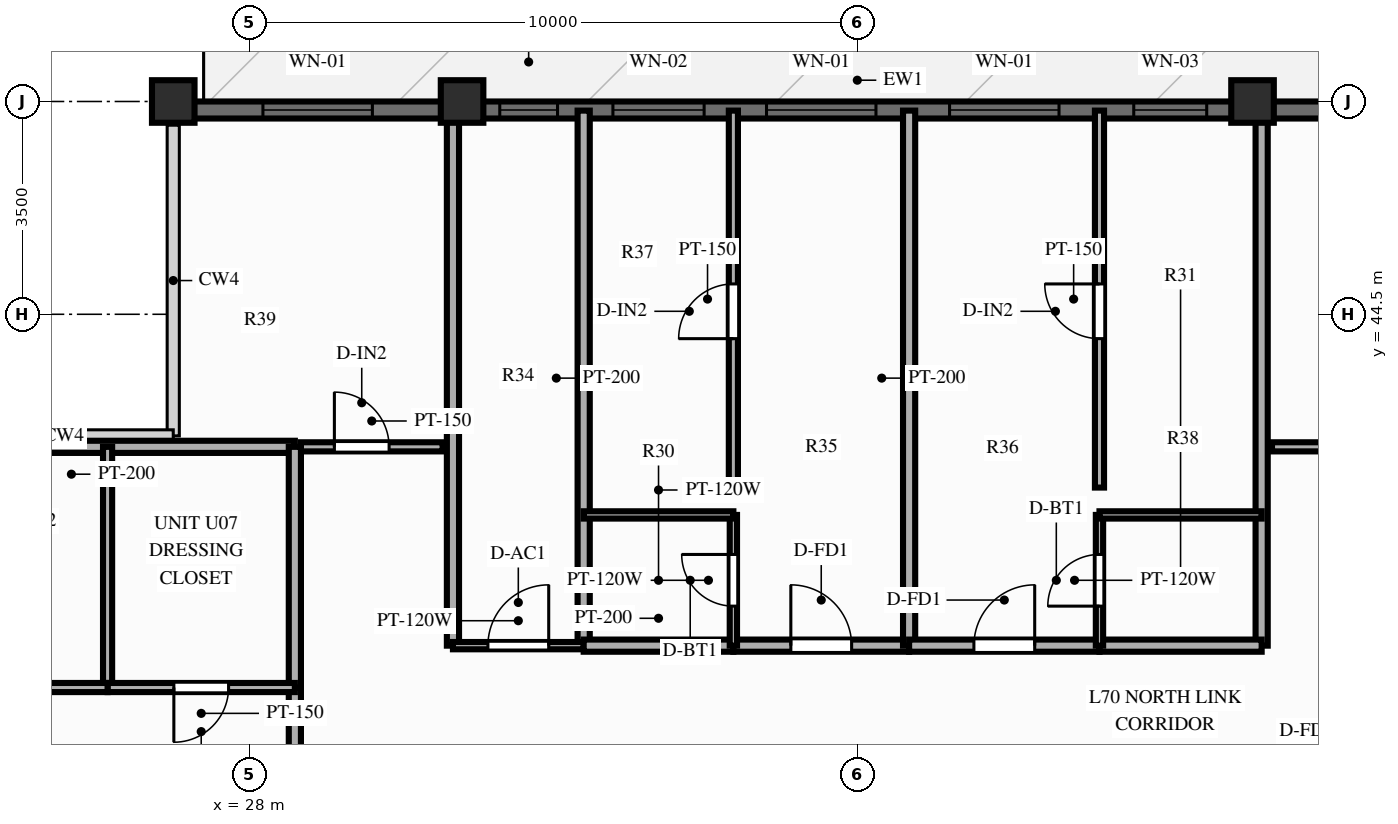
"""IFC4 building model, lengths in metres.
Left out: names, types, materials, properties, quantities, classifications, styles, units other than length and angle.
Written with IfcOpenShell. Run it as: python <this file> out.ifc"""

import sys

from ifc_helpers import new_model, si_unit, direction, frame, frame_2d, origin, origin_2d, place, context, subcontext, project, spatial, rectangle, extrude, source, transform, mapped, element, fill, save


model = new_model("IFC4")
c1 = context("Model", 3, precision=1e-05, world=origin(), true_north=direction((0.0, 1.0)))
c2 = subcontext(c1, "Body", "Model", "MODEL_VIEW")
j1 = project(units=[si_unit("LENGTHUNIT", "METRE"), si_unit("PLANEANGLEUNIT", "RADIAN")], contexts=[c1])
p1 = place(None, origin())
s1 = spatial("IfcSite", under=j1, at=p1, CompositionType="ELEMENT")
p2 = place(p1, origin())
s2 = spatial("IfcBuilding", under=s1, at=p2, CompositionType="ELEMENT")
p3 = place(p2, frame((0.0, 0.0, 226.2)))
s3 = spatial("IfcBuildingStorey", under=s2, at=p3, CompositionType="ELEMENT", Elevation=226.2)
m1 = source(origin(), c2, "Body", "SweptSolid", [
    extrude(rectangle(XDim=0.7, YDim=0.7, at=origin_2d()), origin(), (0.0, 0.0, 1.0), 3.9),
])
for number, where, z_axis, x_axis in (
    (1, (44.5, 48.0, 0.0), (0.0, 0.0, 1.0), (1.0, 0.0, 0.0)),
    (2, (31.5, 48.0, 0.0), (0.0, 0.0, 1.0), (1.0, 0.0, 0.0)),
    (3, (26.75, 48.0, 0.0), (0.0, 0.0, 1.0), (1.0, 0.0, 0.0)),
):
    element("IfcColumn", number, at=place(p3, frame(where, z_axis=z_axis, x_axis=x_axis)), inside=s3, PredefinedType="COLUMN", context=c2, shape_type="MappedRepresentation", body=[
        mapped(m1, transform((0.0, 0.0, 0.0), scale=1.0)),
    ])
p4 = place(p3, frame((26.75, 47.86, 0.0), z_axis=(0.0, 0.0, 1.0), x_axis=(1.0, 0.0, 0.0)))
e4 = element("IfcWall", 4, at=p4, inside=s3, PredefinedType="SOLIDWALL", context=c2, shape_type="SweptSolid", body=[
    extrude(rectangle(XDim=22.5, YDim=0.28, at=frame_2d((11.25, 0.0))), origin(), (0.0, 0.0, 1.0), 2.79),
])
p5 = place(p4, frame((1.475, 0.0, 0.85)))
e5 = element("IfcOpeningElement", 5, at=p5, cuts=e4, PredefinedType="OPENING", context=c2, shape_type="SweptSolid", body=[
    extrude(rectangle(XDim=1.8, YDim=1.65, at=frame_2d((0.9, 0.825))), frame((0.0, 0.152, 0.0), z_axis=(0.0, -1.0, 0.0), x_axis=(1.0, 0.0, 0.0)), (0.0, 0.0, 1.0), 0.304),
])
p6 = place(p4, frame((5.37, 0.0, 0.85)))
e6 = element("IfcOpeningElement", 6, at=p6, cuts=e4, PredefinedType="OPENING", context=c2, shape_type="SweptSolid", body=[
    extrude(rectangle(XDim=0.95, YDim=1.5, at=frame_2d((0.475, 0.75))), frame((0.0, 0.152, 0.0), z_axis=(0.0, -1.0, 0.0), x_axis=(1.0, 0.0, 0.0)), (0.0, 0.0, 1.0), 0.304),
])
p7 = place(p4, frame((7.231, 0.0, 0.85)))
e7 = element("IfcOpeningElement", 7, at=p7, cuts=e4, PredefinedType="OPENING", context=c2, shape_type="SweptSolid", body=[
    extrude(rectangle(XDim=1.5, YDim=1.65, at=frame_2d((0.75, 0.825))), frame((0.0, 0.152, 0.0), z_axis=(0.0, -1.0, 0.0), x_axis=(1.0, 0.0, 0.0)), (0.0, 0.0, 1.0), 0.304),
])
p8 = place(p4, frame((9.757, 0.0, 0.85)))
e8 = element("IfcOpeningElement", 8, at=p8, cuts=e4, PredefinedType="OPENING", context=c2, shape_type="SweptSolid", body=[
    extrude(rectangle(XDim=1.8, YDim=1.65, at=frame_2d((0.9, 0.825))), frame((0.0, 0.152, 0.0), z_axis=(0.0, -1.0, 0.0), x_axis=(1.0, 0.0, 0.0)), (0.0, 0.0, 1.0), 0.304),
])
p9 = place(p4, frame((12.767, 0.0, 0.85)))
e9 = element("IfcOpeningElement", 9, at=p9, cuts=e4, PredefinedType="OPENING", context=c2, shape_type="SweptSolid", body=[
    extrude(rectangle(XDim=1.8, YDim=1.65, at=frame_2d((0.9, 0.825))), frame((0.0, 0.152, 0.0), z_axis=(0.0, -1.0, 0.0), x_axis=(1.0, 0.0, 0.0)), (0.0, 0.0, 1.0), 0.304),
])
p10 = place(p4, frame((15.796, 0.0, 0.85)))
e10 = element("IfcOpeningElement", 10, at=p10, cuts=e4, PredefinedType="OPENING", context=c2, shape_type="SweptSolid", body=[
    extrude(rectangle(XDim=1.2, YDim=1.5, at=frame_2d((0.6, 0.75))), frame((0.0, 0.152, 0.0), z_axis=(0.0, -1.0, 0.0), x_axis=(1.0, 0.0, 0.0)), (0.0, 0.0, 1.0), 0.304),
])
p11 = place(p4, frame((19.575, 0.0, 0.0)))
e11 = element("IfcOpeningElement", 11, at=p11, cuts=e4, PredefinedType="OPENING", context=c2, shape_type="SweptSolid", body=[
    extrude(rectangle(XDim=1.1, YDim=2.15, at=frame_2d((0.55, 1.075))), frame((0.0, 0.152, 0.0), z_axis=(0.0, -1.0, 0.0), x_axis=(1.0, 0.0, 0.0)), (0.0, 0.0, 1.0), 0.304),
])
p12 = place(p3, frame((28.85, 42.32, 0.0), z_axis=(0.0, 0.0, 1.0), x_axis=(1.0, 0.0, 0.0)))
e12 = element("IfcWall", 12, at=p12, inside=s3, PredefinedType="PARTITIONING", context=c2, shape_type="SweptSolid", body=[
    extrude(rectangle(XDim=2.33, YDim=0.15, at=frame_2d((1.165, 0.0))), origin(), (0.0, 0.0, 1.0), 3.69),
])
p13 = place(p12, frame((0.55, 0.0, 0.0)))
e13 = element("IfcOpeningElement", 13, at=p13, cuts=e12, PredefinedType="OPENING", context=c2, shape_type="SweptSolid", body=[
    extrude(rectangle(XDim=0.9, YDim=2.1, at=frame_2d((0.45, 1.05))), frame((0.0, 0.087, 0.0), z_axis=(0.0, -1.0, 0.0), x_axis=(1.0, 0.0, 0.0)), (0.0, 0.0, 1.0), 0.174),
])
p14 = place(p3, frame((44.82, 42.32, 0.0), z_axis=(0.0, 0.0, 1.0), x_axis=(1.0, 0.0, 0.0)))
e14 = element("IfcWall", 14, at=p14, inside=s3, PredefinedType="PARTITIONING", context=c2, shape_type="SweptSolid", body=[
    extrude(rectangle(XDim=2.33, YDim=0.15, at=frame_2d((1.165, 0.0))), origin(), (0.0, 0.0, 1.0), 3.69),
])
p15 = place(p14, frame((0.88, 0.0, 0.0)))
e15 = element("IfcOpeningElement", 15, at=p15, cuts=e14, PredefinedType="OPENING", context=c2, shape_type="SweptSolid", body=[
    extrude(rectangle(XDim=0.9, YDim=2.1, at=frame_2d((0.45, 1.05))), frame((0.0, 0.087, 0.0), z_axis=(0.0, -1.0, 0.0), x_axis=(1.0, 0.0, 0.0)), (0.0, 0.0, 1.0), 0.174),
])
for number, where, z_axis, x_axis in (
    (16, (31.35, 39.05, 0.0), (0.0, 0.0, 1.0), (0.0, 1.0, 0.0)),
    (17, (44.65, 39.05, 0.0), (0.0, 0.0, 1.0), (0.0, 1.0, 0.0)),
):
    element("IfcWall", number, at=place(p3, frame(where, z_axis=z_axis, x_axis=x_axis)), inside=s3, PredefinedType="PARTITIONING", context=c2, shape_type="SweptSolid", body=[
        extrude(rectangle(XDim=8.8, YDim=0.2, at=frame_2d((4.4, 0.0))), origin(), (0.0, 0.0, 1.0), 2.79),
    ])
p16 = place(p3, frame((33.5, 39.05, 0.0), z_axis=(0.0, 0.0, 1.0), x_axis=(0.0, 1.0, 0.0)))
e18 = element("IfcWall", 18, at=p16, inside=s3, PredefinedType="PARTITIONING", context=c2, shape_type="SweptSolid", body=[
    extrude(rectangle(XDim=8.8, YDim=0.2, at=frame_2d((4.4, 0.0))), origin(), (0.0, 0.0, 1.0), 3.69),
])
p17 = place(p3, frame((31.35, 39.05, 0.0), z_axis=(0.0, 0.0, 1.0), x_axis=(1.0, 0.0, 0.0)))
e19 = element("IfcWall", 19, at=p17, inside=s3, PredefinedType="PARTITIONING", context=c2, shape_type="SweptSolid", body=[
    extrude(rectangle(XDim=2.15, YDim=0.12, at=frame_2d((1.075, 0.0))), origin(), (0.0, 0.0, 1.0), 3.69),
])
p18 = place(p17, frame((0.575, 0.0, 0.0)))
e20 = element("IfcOpeningElement", 20, at=p18, cuts=e19, PredefinedType="OPENING", context=c2, shape_type="SweptSolid", body=[
    extrude(rectangle(XDim=1.0, YDim=2.1, at=frame_2d((0.5, 1.05))), frame((0.0, 0.072, 0.0), z_axis=(0.0, -1.0, 0.0), x_axis=(1.0, 0.0, 0.0)), (0.0, 0.0, 1.0), 0.144),
])
p19 = place(p3, frame((33.5, 39.05, 0.0), z_axis=(0.0, 0.0, 1.0), x_axis=(1.0, 0.0, 0.0)))
e21 = element("IfcWall", 21, at=p19, inside=s3, PredefinedType="PARTITIONING", context=c2, shape_type="SweptSolid", body=[
    extrude(rectangle(XDim=2.462, YDim=0.2, at=frame_2d((1.231, 0.0))), origin(), (0.0, 0.0, 1.0), 3.69),
])
p20 = place(p3, frame((35.962, 39.05, 0.0), z_axis=(0.0, 0.0, 1.0), x_axis=(1.0, 0.0, 0.0)))
e22 = element("IfcWall", 22, at=p20, inside=s3, PredefinedType="PARTITIONING", context=c2, shape_type="SweptSolid", body=[
    extrude(rectangle(XDim=2.89, YDim=0.2, at=frame_2d((1.445, 0.0))), origin(), (0.0, 0.0, 1.0), 3.69),
])
p21 = place(p20, frame((0.945, 0.0, 0.0)))
e23 = element("IfcOpeningElement", 23, at=p21, cuts=e22, PredefinedType="OPENING", context=c2, shape_type="SweptSolid", body=[
    extrude(rectangle(XDim=1.0, YDim=2.15, at=frame_2d((0.5, 1.075))), frame((0.0, 0.112, 0.0), z_axis=(0.0, -1.0, 0.0), x_axis=(1.0, 0.0, 0.0)), (0.0, 0.0, 1.0), 0.224),
])
p22 = place(p3, frame((35.962, 39.05, 0.0), z_axis=(0.0, 0.0, 1.0), x_axis=(0.0, 1.0, 0.0)))
e24 = element("IfcWall", 24, at=p22, inside=s3, PredefinedType="PARTITIONING", context=c2, shape_type="SweptSolid", body=[
    extrude(rectangle(XDim=2.15, YDim=0.12, at=frame_2d((1.075, 0.0))), origin(), (0.0, 0.0, 1.0), 3.69),
])
p23 = place(p22, frame((0.65, 0.0, 0.0)))
e25 = element("IfcOpeningElement", 25, at=p23, cuts=e24, PredefinedType="OPENING", context=c2, shape_type="SweptSolid", body=[
    extrude(rectangle(XDim=0.85, YDim=2.05, at=frame_2d((0.425, 1.025))), frame((0.0, 0.072, 0.0), z_axis=(0.0, -1.0, 0.0), x_axis=(1.0, 0.0, 0.0)), (0.0, 0.0, 1.0), 0.144),
])
p24 = place(p3, frame((33.5, 41.2, 0.0), z_axis=(0.0, 0.0, 1.0), x_axis=(1.0, 0.0, 0.0)))
e26 = element("IfcWall", 26, at=p24, inside=s3, PredefinedType="PARTITIONING", context=c2, shape_type="SweptSolid", body=[
    extrude(rectangle(XDim=2.462, YDim=0.12, at=frame_2d((1.231, 0.0))), origin(), (0.0, 0.0, 1.0), 3.69),
])
p25 = place(p3, frame((35.962, 41.65, 0.0), z_axis=(0.0, 0.0, 1.0), x_axis=(0.0, 1.0, 0.0)))
e27 = element("IfcWall", 27, at=p25, inside=s3, PredefinedType="PARTITIONING", context=c2, shape_type="SweptSolid", body=[
    extrude(rectangle(XDim=6.2, YDim=0.15, at=frame_2d((3.1, 0.0))), origin(), (0.0, 0.0, 1.0), 3.69),
])
p26 = place(p25, frame((2.449, 0.0, 0.0)))
e28 = element("IfcOpeningElement", 28, at=p26, cuts=e27, PredefinedType="OPENING", context=c2, shape_type="SweptSolid", body=[
    extrude(rectangle(XDim=0.9, YDim=2.1, at=frame_2d((0.45, 1.05))), frame((0.0, 0.087, 0.0), z_axis=(0.0, -1.0, 0.0), x_axis=(1.0, 0.0, 0.0)), (0.0, 0.0, 1.0), 0.174),
])
p27 = place(p3, frame((38.852, 39.05, 0.0), z_axis=(0.0, 0.0, 1.0), x_axis=(0.0, 1.0, 0.0)))
e29 = element("IfcWall", 29, at=p27, inside=s3, PredefinedType="PARTITIONING", context=c2, shape_type="SweptSolid", body=[
    extrude(rectangle(XDim=8.8, YDim=0.2, at=frame_2d((4.4, 0.0))), origin(), (0.0, 0.0, 1.0), 3.69),
])
p28 = place(p3, frame((38.852, 39.05, 0.0), z_axis=(0.0, 0.0, 1.0), x_axis=(1.0, 0.0, 0.0)))
e30 = element("IfcWall", 30, at=p28, inside=s3, PredefinedType="PARTITIONING", context=c2, shape_type="SweptSolid", body=[
    extrude(rectangle(XDim=3.131, YDim=0.2, at=frame_2d((1.565, 0.0))), origin(), (0.0, 0.0, 1.0), 3.69),
])
p29 = place(p28, frame((1.065, 0.0, 0.0)))
e31 = element("IfcOpeningElement", 31, at=p29, cuts=e30, PredefinedType="OPENING", context=c2, shape_type="SweptSolid", body=[
    extrude(rectangle(XDim=1.0, YDim=2.15, at=frame_2d((0.5, 1.075))), frame((0.0, 0.112, 0.0), z_axis=(0.0, -1.0, 0.0), x_axis=(1.0, 0.0, 0.0)), (0.0, 0.0, 1.0), 0.224),
])
p30 = place(p3, frame((41.983, 39.05, 0.0), z_axis=(0.0, 0.0, 1.0), x_axis=(1.0, 0.0, 0.0)))
e32 = element("IfcWall", 32, at=p30, inside=s3, PredefinedType="PARTITIONING", context=c2, shape_type="SweptSolid", body=[
    extrude(rectangle(XDim=2.667, YDim=0.2, at=frame_2d((1.333, 0.0))), origin(), (0.0, 0.0, 1.0), 3.69),
])
p31 = place(p3, frame((41.983, 39.05, 0.0), z_axis=(0.0, 0.0, 1.0), x_axis=(0.0, 1.0, 0.0)))
e33 = element("IfcWall", 33, at=p31, inside=s3, PredefinedType="PARTITIONING", context=c2, shape_type="SweptSolid", body=[
    extrude(rectangle(XDim=2.15, YDim=0.12, at=frame_2d((1.075, 0.0))), origin(), (0.0, 0.0, 1.0), 3.69),
])
p32 = place(p31, frame((0.65, 0.0, 0.0)))
e34 = element("IfcOpeningElement", 34, at=p32, cuts=e33, PredefinedType="OPENING", context=c2, shape_type="SweptSolid", body=[
    extrude(rectangle(XDim=0.85, YDim=2.05, at=frame_2d((0.425, 1.025))), frame((0.0, 0.072, 0.0), z_axis=(0.0, -1.0, 0.0), x_axis=(1.0, 0.0, 0.0)), (0.0, 0.0, 1.0), 0.144),
])
p33 = place(p3, frame((41.983, 41.2, 0.0), z_axis=(0.0, 0.0, 1.0), x_axis=(1.0, 0.0, 0.0)))
e35 = element("IfcWall", 35, at=p33, inside=s3, PredefinedType="PARTITIONING", context=c2, shape_type="SweptSolid", body=[
    extrude(rectangle(XDim=2.667, YDim=0.12, at=frame_2d((1.333, 0.0))), origin(), (0.0, 0.0, 1.0), 3.69),
])
p34 = place(p3, frame((41.983, 41.65, 0.0), z_axis=(0.0, 0.0, 1.0), x_axis=(0.0, 1.0, 0.0)))
e36 = element("IfcWall", 36, at=p34, inside=s3, PredefinedType="PARTITIONING", context=c2, shape_type="SweptSolid", body=[
    extrude(rectangle(XDim=6.2, YDim=0.15, at=frame_2d((3.1, 0.0))), origin(), (0.0, 0.0, 1.0), 3.69),
])
p35 = place(p34, frame((2.449, 0.0, 0.0)))
e37 = element("IfcOpeningElement", 37, at=p35, cuts=e36, PredefinedType="OPENING", context=c2, shape_type="SweptSolid", body=[
    extrude(rectangle(XDim=0.9, YDim=2.1, at=frame_2d((0.45, 1.05))), frame((0.0, 0.087, 0.0), z_axis=(0.0, -1.0, 0.0), x_axis=(1.0, 0.0, 0.0)), (0.0, 0.0, 1.0), 0.174),
])
p36 = place(p3, frame((28.75, 42.32, 0.0), z_axis=(0.0, 0.0, 1.0), x_axis=(-1.0, 0.0, 0.0)))
e38 = element("IfcWall", 38, at=p36, inside=s3, PredefinedType="PARTITIONING", context=c2, shape_type="SweptSolid", body=[
    extrude(rectangle(XDim=7.35, YDim=0.2, at=frame_2d((3.675, 0.0))), origin(), (0.0, 0.0, 1.0), 3.69),
])
p37 = place(p3, frame((28.75, 34.652, 0.0), z_axis=(0.0, 0.0, 1.0), x_axis=(0.0, 1.0, 0.0)))
e39 = element("IfcWall", 39, at=p37, inside=s3, PredefinedType="PARTITIONING", context=c2, shape_type="SweptSolid", body=[
    extrude(rectangle(XDim=3.709, YDim=0.2, at=frame_2d((1.854, 0.0))), origin(), (0.0, 0.0, 1.0), 3.69),
])
p38 = place(p37, frame((0.26, 0.0, 0.0)))
e40 = element("IfcOpeningElement", 40, at=p38, cuts=e39, PredefinedType="OPENING", context=c2, shape_type="SweptSolid", body=[
    extrude(rectangle(XDim=1.0, YDim=2.15, at=frame_2d((0.5, 1.075))), frame((0.0, 0.112, 0.0), z_axis=(0.0, -1.0, 0.0), x_axis=(1.0, 0.0, 0.0)), (0.0, 0.0, 1.0), 0.224),
])
p39 = place(p3, frame((28.75, 38.361, 0.0), z_axis=(0.0, 0.0, 1.0), x_axis=(0.0, 1.0, 0.0)))
e41 = element("IfcWall", 41, at=p39, inside=s3, PredefinedType="PARTITIONING", context=c2, shape_type="SweptSolid", body=[
    extrude(rectangle(XDim=3.959, YDim=0.2, at=frame_2d((1.979, 0.0))), origin(), (0.0, 0.0, 1.0), 3.69),
])
p40 = place(p3, frame((25.67, 38.361, 0.0), z_axis=(0.0, 0.0, 1.0), x_axis=(0.0, 1.0, 0.0)))
e42 = element("IfcWall", 42, at=p40, inside=s3, PredefinedType="PARTITIONING", context=c2, shape_type="SweptSolid", body=[
    extrude(rectangle(XDim=3.959, YDim=0.15, at=frame_2d((1.979, 0.0))), origin(), (0.0, 0.0, 1.0), 3.69),
])
p41 = place(p3, frame((28.75, 38.361, 0.0), z_axis=(0.0, 0.0, 1.0), x_axis=(-1.0, 0.0, 0.0)))
e43 = element("IfcWall", 43, at=p41, inside=s3, PredefinedType="PARTITIONING", context=c2, shape_type="SweptSolid", body=[
    extrude(rectangle(XDim=3.08, YDim=0.15, at=frame_2d((1.54, 0.0))), origin(), (0.0, 0.0, 1.0), 3.69),
])
p42 = place(p41, frame((1.09, 0.0, 0.0)))
e44 = element("IfcOpeningElement", 44, at=p42, cuts=e43, PredefinedType="OPENING", context=c2, shape_type="SweptSolid", body=[
    extrude(rectangle(XDim=0.9, YDim=2.1, at=frame_2d((0.45, 1.05))), frame((0.0, 0.087, 0.0), z_axis=(0.0, -1.0, 0.0), x_axis=(1.0, 0.0, 0.0)), (0.0, 0.0, 1.0), 0.174),
])
p43 = place(p3, frame((25.67, 38.361, 0.0), z_axis=(0.0, 0.0, 1.0), x_axis=(-1.0, 0.0, 0.0)))
e45 = element("IfcWall", 45, at=p43, inside=s3, PredefinedType="PARTITIONING", context=c2, shape_type="SweptSolid", body=[
    extrude(rectangle(XDim=4.27, YDim=0.15, at=frame_2d((2.135, 0.0))), origin(), (0.0, 0.0, 1.0), 3.69),
])
p44 = place(p43, frame((1.565, 0.0, 0.0)))
e46 = element("IfcOpeningElement", 46, at=p44, cuts=e45, PredefinedType="OPENING", context=c2, shape_type="SweptSolid", body=[
    extrude(rectangle(XDim=0.9, YDim=2.1, at=frame_2d((0.45, 1.05))), frame((0.0, 0.087, 0.0), z_axis=(0.0, -1.0, 0.0), x_axis=(1.0, 0.0, 0.0)), (0.0, 0.0, 1.0), 0.174),
])
m2 = source(origin(), c2, "Body", "SweptSolid", [
    extrude(rectangle(XDim=1.8, YDim=1.65, at=frame_2d((0.9, 0.825))), frame((0.0, 0.03, 0.0), z_axis=(0.0, -1.0, 0.0), x_axis=(1.0, 0.0, 0.0)), (0.0, 0.0, 1.0), 0.06),
])
p45 = place(p5, origin())
e47 = element("IfcWindow", 47, at=p45, inside=s3, PartitioningType="SINGLE_PANEL", PredefinedType="WINDOW", context=c2, shape_type="MappedRepresentation", body=[
    mapped(m2, transform((0.0, 0.0, 0.0), scale=1.0)),
])
fill(e5, e47)
m3 = source(origin(), c2, "Body", "SweptSolid", [
    extrude(rectangle(XDim=0.95, YDim=1.5, at=frame_2d((0.475, 0.75))), frame((0.0, 0.03, 0.0), z_axis=(0.0, -1.0, 0.0), x_axis=(1.0, 0.0, 0.0)), (0.0, 0.0, 1.0), 0.06),
])
p46 = place(p6, origin())
e48 = element("IfcWindow", 48, at=p46, inside=s3, PartitioningType="SINGLE_PANEL", PredefinedType="WINDOW", context=c2, shape_type="MappedRepresentation", body=[
    mapped(m3, transform((0.0, 0.0, 0.0), scale=1.0)),
])
fill(e6, e48)
m4 = source(origin(), c2, "Body", "SweptSolid", [
    extrude(rectangle(XDim=1.5, YDim=1.65, at=frame_2d((0.75, 0.825))), frame((0.0, 0.03, 0.0), z_axis=(0.0, -1.0, 0.0), x_axis=(1.0, 0.0, 0.0)), (0.0, 0.0, 1.0), 0.06),
])
p47 = place(p7, origin())
e49 = element("IfcWindow", 49, at=p47, inside=s3, PartitioningType="SINGLE_PANEL", PredefinedType="WINDOW", context=c2, shape_type="MappedRepresentation", body=[
    mapped(m4, transform((0.0, 0.0, 0.0), scale=1.0)),
])
fill(e7, e49)
p48 = place(p8, origin())
e50 = element("IfcWindow", 50, at=p48, inside=s3, PartitioningType="SINGLE_PANEL", PredefinedType="WINDOW", context=c2, shape_type="MappedRepresentation", body=[
    mapped(m2, transform((0.0, 0.0, 0.0), scale=1.0)),
])
fill(e8, e50)
p49 = place(p9, origin())
e51 = element("IfcWindow", 51, at=p49, inside=s3, PartitioningType="SINGLE_PANEL", PredefinedType="WINDOW", context=c2, shape_type="MappedRepresentation", body=[
    mapped(m2, transform((0.0, 0.0, 0.0), scale=1.0)),
])
fill(e9, e51)
m5 = source(origin(), c2, "Body", "SweptSolid", [
    extrude(rectangle(XDim=1.2, YDim=1.5, at=frame_2d((0.6, 0.75))), frame((0.0, 0.03, 0.0), z_axis=(0.0, -1.0, 0.0), x_axis=(1.0, 0.0, 0.0)), (0.0, 0.0, 1.0), 0.06),
])
p50 = place(p10, origin())
e52 = element("IfcWindow", 52, at=p50, inside=s3, PartitioningType="SINGLE_PANEL", PredefinedType="WINDOW", context=c2, shape_type="MappedRepresentation", body=[
    mapped(m5, transform((0.0, 0.0, 0.0), scale=1.0)),
])
fill(e10, e52)
m6 = source(origin(), c2, "Body", "SweptSolid", [
    extrude(rectangle(XDim=0.9, YDim=2.1, at=frame_2d((0.45, 1.05))), frame((0.0, 0.025, 0.0), z_axis=(0.0, -1.0, 0.0), x_axis=(1.0, 0.0, 0.0)), (0.0, 0.0, 1.0), 0.05),
])
p51 = place(p13, origin())
e53 = element("IfcDoor", 53, at=p51, inside=s3, OperationType="SINGLE_SWING_LEFT", PredefinedType="DOOR", context=c2, shape_type="MappedRepresentation", body=[
    mapped(m6, transform((0.0, 0.0, 0.0), scale=1.0)),
])
fill(e13, e53)
m7 = source(origin(), c2, "Body", "SweptSolid", [
    extrude(rectangle(XDim=1.0, YDim=2.1, at=frame_2d((0.5, 1.05))), frame((0.0, 0.025, 0.0), z_axis=(0.0, -1.0, 0.0), x_axis=(1.0, 0.0, 0.0)), (0.0, 0.0, 1.0), 0.05),
])
p52 = place(p18, origin())
e54 = element("IfcDoor", 54, at=p52, inside=s3, OperationType="SINGLE_SWING_RIGHT", PredefinedType="DOOR", context=c2, shape_type="MappedRepresentation", body=[
    mapped(m7, transform((0.0, 0.0, 0.0), scale=1.0)),
])
fill(e20, e54)
m8 = source(origin(), c2, "Body", "SweptSolid", [
    extrude(rectangle(XDim=1.0, YDim=2.15, at=frame_2d((0.5, 1.075))), frame((0.0, 0.025, 0.0), z_axis=(0.0, -1.0, 0.0), x_axis=(1.0, 0.0, 0.0)), (0.0, 0.0, 1.0), 0.05),
])
p53 = place(p21, origin())
e55 = element("IfcDoor", 55, at=p53, inside=s3, OperationType="SINGLE_SWING_LEFT", PredefinedType="DOOR", context=c2, shape_type="MappedRepresentation", body=[
    mapped(m8, transform((0.0, 0.0, 0.0), scale=1.0)),
])
fill(e23, e55)
m9 = source(origin(), c2, "Body", "SweptSolid", [
    extrude(rectangle(XDim=0.85, YDim=2.05, at=frame_2d((0.425, 1.025))), frame((0.0, 0.025, 0.0), z_axis=(0.0, -1.0, 0.0), x_axis=(1.0, 0.0, 0.0)), (0.0, 0.0, 1.0), 0.05),
])
p54 = place(p23, origin())
e56 = element("IfcDoor", 56, at=p54, inside=s3, OperationType="SINGLE_SWING_RIGHT", PredefinedType="DOOR", context=c2, shape_type="MappedRepresentation", body=[
    mapped(m9, transform((0.0, 0.0, 0.0), scale=1.0)),
])
fill(e25, e56)
p55 = place(p26, origin())
e57 = element("IfcDoor", 57, at=p55, inside=s3, OperationType="SINGLE_SWING_LEFT", PredefinedType="DOOR", context=c2, shape_type="MappedRepresentation", body=[
    mapped(m6, transform((0.0, 0.0, 0.0), scale=1.0)),
])
fill(e28, e57)
p56 = place(p29, origin())
e58 = element("IfcDoor", 58, at=p56, inside=s3, OperationType="SINGLE_SWING_RIGHT", PredefinedType="DOOR", context=c2, shape_type="MappedRepresentation", body=[
    mapped(m8, transform((0.0, 0.0, 0.0), scale=1.0)),
])
fill(e31, e58)
p57 = place(p32, origin())
e59 = element("IfcDoor", 59, at=p57, inside=s3, OperationType="SINGLE_SWING_LEFT", PredefinedType="DOOR", context=c2, shape_type="MappedRepresentation", body=[
    mapped(m9, transform((0.0, 0.0, 0.0), scale=1.0)),
])
fill(e34, e59)
p58 = place(p35, origin())
e60 = element("IfcDoor", 60, at=p58, inside=s3, OperationType="SINGLE_SWING_RIGHT", PredefinedType="DOOR", context=c2, shape_type="MappedRepresentation", body=[
    mapped(m6, transform((0.0, 0.0, 0.0), scale=1.0)),
])
fill(e37, e60)
p59 = place(p42, origin())
e61 = element("IfcDoor", 61, at=p59, inside=s3, OperationType="SINGLE_SWING_RIGHT", PredefinedType="DOOR", context=c2, shape_type="MappedRepresentation", body=[
    mapped(m6, transform((0.0, 0.0, 0.0), scale=1.0)),
])
fill(e44, e61)
save(model, sys.argv[1])
